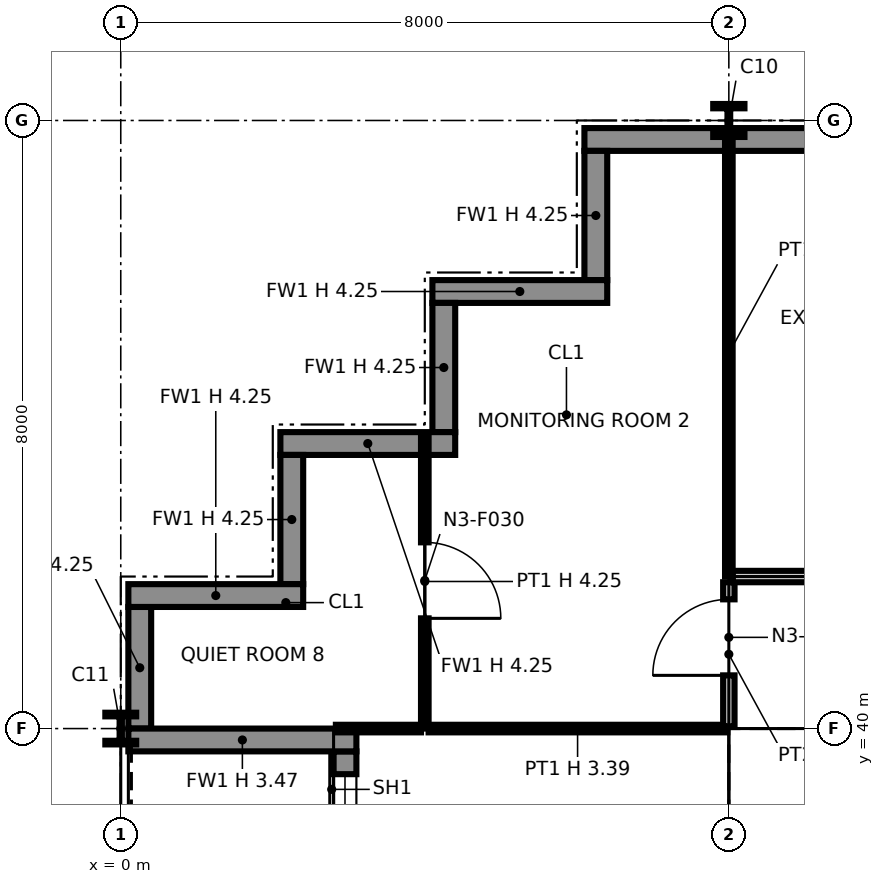
"""IFC4 building model, lengths in metres.
Left out: names, types, materials, properties, quantities, classifications, styles, units other than length and angle.
Written with IfcOpenShell. Run it as: python <this file> out.ifc"""

import sys

from ifc_helpers import new_model, si_unit, direction, frame, frame_2d, origin, origin_2d, place, context, subcontext, project, spatial, polyline, rectangle, i_section, outline, extrude, element, fill, save


model = new_model("IFC4")
c1 = context("Model", 3, precision=1e-05, world=origin(), true_north=direction((0.0, 1.0)))
c2 = subcontext(c1, "Body", "Model", "MODEL_VIEW")
j1 = project(units=[si_unit("LENGTHUNIT", "METRE"), si_unit("PLANEANGLEUNIT", "RADIAN")], contexts=[c1])
p1 = place(None, origin())
s1 = spatial("IfcSite", under=j1, at=p1, CompositionType="ELEMENT")
p2 = place(p1, origin())
s2 = spatial("IfcBuilding", under=s1, at=p2, CompositionType="ELEMENT")
p3 = place(p2, frame((0.0, 0.0, 61.2)))
s3 = spatial("IfcBuildingStorey", under=s2, at=p3, CompositionType="ELEMENT", Elevation=61.2)
p4 = place(p3, frame((0.0, 40.0, 0.0), z_axis=(0.0, 0.0, 1.0), x_axis=(1.0, 0.0, 0.0)))
e1 = element("IfcColumn", 1, at=p4, inside=s3, PredefinedType="COLUMN", context=c2, shape_type="SweptSolid", body=[
    extrude(i_section(OverallWidth=0.406, OverallDepth=0.417, WebThickness=0.03, FlangeThickness=0.048, at=origin_2d()), origin(), (0.0, 0.0, 1.0), 4.25),
])
p5 = place(p3, frame((8.0, 40.0, 0.0), z_axis=(0.0, 0.0, 1.0), x_axis=(1.0, 0.0, 0.0)))
e2 = element("IfcColumn", 2, at=p5, inside=s3, PredefinedType="COLUMN", context=c2, shape_type="SweptSolid", body=[
    extrude(i_section(OverallWidth=0.399, OverallDepth=0.386, WebThickness=0.021, FlangeThickness=0.033, at=origin_2d()), origin(), (0.0, 0.0, 1.0), 4.25),
])
p6 = place(p3, frame((8.0, 48.0, 0.0), z_axis=(0.0, 0.0, 1.0), x_axis=(1.0, 0.0, 0.0)))
e3 = element("IfcColumn", 3, at=p6, inside=s3, PredefinedType="COLUMN", context=c2, shape_type="SweptSolid", body=[
    extrude(i_section(OverallWidth=0.411, OverallDepth=0.434, WebThickness=0.036, FlangeThickness=0.057, at=origin_2d()), origin(), (0.0, 0.0, 1.0), 4.25),
])
p7 = place(p3, frame((0.25, 41.6, 0.0), z_axis=(0.0, 0.0, 1.0), x_axis=(0.0, -1.0, 0.0)))
e4 = element("IfcWall", 4, at=p7, inside=s3, PredefinedType="SOLIDWALL", context=c2, shape_type="SweptSolid", body=[
    extrude(rectangle(XDim=1.6, YDim=0.3, at=frame_2d((0.8, 0.0))), origin(), (0.0, 0.0, 1.0), 4.25),
])
p8 = place(p3, frame((2.95, 39.7, 0.0), z_axis=(0.0, 0.0, 1.0), x_axis=(0.0, -1.0, 0.0)))
e5 = element("IfcWall", 5, at=p8, inside=s3, PredefinedType="SOLIDWALL", context=c2, shape_type="SweptSolid", body=[
    extrude(rectangle(XDim=7.4, YDim=0.3, at=frame_2d((3.7, 0.0))), origin(), (0.0, 0.0, 1.0), 4.25),
])
p9 = place(p8, frame((0.3, 0.0, 0.9)))
e6 = element("IfcOpeningElement", 6, at=p9, cuts=e5, PredefinedType="OPENING", context=c2, shape_type="SweptSolid", body=[
    extrude(rectangle(XDim=2.8, YDim=2.2, at=frame_2d((1.4, 1.1))), frame((0.0, 0.16, 0.0), z_axis=(0.0, -1.0, 0.0), x_axis=(1.0, 0.0, 0.0)), (0.0, 0.0, 1.0), 0.32),
])
p10 = place(p8, frame((4.7, 0.0, 0.0)))
e7 = element("IfcOpeningElement", 7, at=p10, cuts=e5, PredefinedType="OPENING", context=c2, shape_type="SweptSolid", body=[
    extrude(rectangle(XDim=2.0, YDim=2.4, at=frame_2d((1.0, 1.2))), frame((0.0, 0.16, 0.0), z_axis=(0.0, -1.0, 0.0), x_axis=(1.0, 0.0, 0.0)), (0.0, 0.0, 1.0), 0.32),
])
p11 = place(p3, frame((0.1, 39.85, 0.0), z_axis=(0.0, 0.0, 1.0), x_axis=(1.0, 0.0, 0.0)))
e8 = element("IfcWall", 8, at=p11, inside=s3, PredefinedType="SOLIDWALL", context=c2, shape_type="SweptSolid", body=[
    extrude(rectangle(XDim=3.0, YDim=0.3, at=frame_2d((1.5, 0.0))), origin(), (0.0, 0.0, 1.0), 3.469),
])
p12 = place(p3, frame((16.0, 47.75, 0.0), z_axis=(0.0, 0.0, 1.0), x_axis=(-1.0, 0.0, 0.0)))
e9 = element("IfcWall", 9, at=p12, inside=s3, PredefinedType="SOLIDWALL", context=c2, shape_type="SweptSolid", body=[
    extrude(rectangle(XDim=9.9, YDim=0.3, at=frame_2d((4.95, 0.0))), origin(), (0.0, 0.0, 1.0), 4.25),
])
p13 = place(p3, frame((6.25, 47.6, 0.0), z_axis=(0.0, 0.0, 1.0), x_axis=(0.0, -1.0, 0.0)))
e10 = element("IfcWall", 10, at=p13, inside=s3, PredefinedType="SOLIDWALL", context=c2, shape_type="SweptSolid", body=[
    extrude(rectangle(XDim=1.7, YDim=0.3, at=frame_2d((0.85, 0.0))), origin(), (0.0, 0.0, 1.0), 4.25),
])
p14 = place(p3, frame((6.4, 45.75, 0.0), z_axis=(0.0, 0.0, 1.0), x_axis=(-1.0, 0.0, 0.0)))
e11 = element("IfcWall", 11, at=p14, inside=s3, PredefinedType="SOLIDWALL", context=c2, shape_type="SweptSolid", body=[
    extrude(rectangle(XDim=2.3, YDim=0.3, at=frame_2d((1.15, 0.0))), origin(), (0.0, 0.0, 1.0), 4.25),
])
p15 = place(p3, frame((4.25, 45.6, 0.0), z_axis=(0.0, 0.0, 1.0), x_axis=(0.0, -1.0, 0.0)))
e12 = element("IfcWall", 12, at=p15, inside=s3, PredefinedType="SOLIDWALL", context=c2, shape_type="SweptSolid", body=[
    extrude(rectangle(XDim=1.7, YDim=0.3, at=frame_2d((0.85, 0.0))), origin(), (0.0, 0.0, 1.0), 4.25),
])
p16 = place(p3, frame((4.4, 43.75, 0.0), z_axis=(0.0, 0.0, 1.0), x_axis=(-1.0, 0.0, 0.0)))
e13 = element("IfcWall", 13, at=p16, inside=s3, PredefinedType="SOLIDWALL", context=c2, shape_type="SweptSolid", body=[
    extrude(rectangle(XDim=2.3, YDim=0.3, at=frame_2d((1.15, 0.0))), origin(), (0.0, 0.0, 1.0), 4.25),
])
p17 = place(p3, frame((2.25, 43.6, 0.0), z_axis=(0.0, 0.0, 1.0), x_axis=(0.0, -1.0, 0.0)))
e14 = element("IfcWall", 14, at=p17, inside=s3, PredefinedType="SOLIDWALL", context=c2, shape_type="SweptSolid", body=[
    extrude(rectangle(XDim=1.7, YDim=0.3, at=frame_2d((0.85, 0.0))), origin(), (0.0, 0.0, 1.0), 4.25),
])
p18 = place(p3, frame((2.4, 41.75, 0.0), z_axis=(0.0, 0.0, 1.0), x_axis=(-1.0, 0.0, 0.0)))
e15 = element("IfcWall", 15, at=p18, inside=s3, PredefinedType="SOLIDWALL", context=c2, shape_type="SweptSolid", body=[
    extrude(rectangle(XDim=2.3, YDim=0.3, at=frame_2d((1.15, 0.0))), origin(), (0.0, 0.0, 1.0), 4.25),
])
p19 = place(p3, frame((8.75, 32.85, 0.0), z_axis=(0.0, 0.0, 1.0), x_axis=(0.0, 1.0, 0.0)))
e16 = element("IfcWall", 16, at=p19, inside=s3, PredefinedType="PARTITIONING", context=c2, shape_type="SweptSolid", body=[
    extrude(outline(polyline([(0.0, 0.0), (6.3, 0.0), (6.3, 4.25), (3.231, 4.25), (3.23, 3.789), (3.07, 3.789), (3.069, 4.25), (0.0, 4.25), (0.0, 0.0)])), frame((0.0, 0.1, 0.0), z_axis=(0.0, -1.0, 0.0), x_axis=(1.0, 0.0, 0.0)), (0.0, 0.0, 1.0), 0.2),
])
p20 = place(p3, frame((8.65, 39.25, 0.0), z_axis=(0.0, 0.0, 1.0), x_axis=(1.0, 0.0, 0.0)))
e17 = element("IfcWall", 17, at=p20, inside=s3, PredefinedType="PARTITIONING", context=c2, shape_type="SweptSolid", body=[
    extrude(outline(polyline([(0.0, 0.0), (14.7, 0.0), (14.7, 4.25), (7.469, 4.25), (7.469, 3.632), (7.231, 3.632), (7.23, 4.25), (0.0, 4.25), (0.0, 0.0)])), frame((0.0, 0.1, 0.0), z_axis=(0.0, -1.0, 0.0), x_axis=(1.0, 0.0, 0.0)), (0.0, 0.0, 1.0), 0.2),
])
p21 = place(p3, frame((2.83, 40.0, 0.0), z_axis=(0.0, 0.0, 1.0), x_axis=(1.0, 0.0, 0.0)))
e18 = element("IfcWall", 18, at=p21, inside=s3, PredefinedType="PARTITIONING", context=c2, shape_type="SweptSolid", body=[
    extrude(rectangle(XDim=1.12, YDim=0.1, at=frame_2d((0.56, 0.0))), origin(), (0.0, 0.0, 1.0), 3.391),
])
p22 = place(p3, frame((4.05, 40.0, 0.0), z_axis=(0.0, 0.0, 1.0), x_axis=(1.0, 0.0, 0.0)))
e19 = element("IfcWall", 19, at=p22, inside=s3, PredefinedType="PARTITIONING", context=c2, shape_type="SweptSolid", body=[
    extrude(rectangle(XDim=3.92, YDim=0.1, at=frame_2d((1.96, 0.0))), origin(), (0.0, 0.0, 1.0), 3.391),
])
p23 = place(p3, frame((4.0, 40.0, 0.0), z_axis=(0.0, 0.0, 1.0), x_axis=(0.0, 1.0, 0.0)))
e20 = element("IfcWall", 20, at=p23, inside=s3, PredefinedType="PARTITIONING", context=c2, shape_type="SweptSolid", body=[
    extrude(rectangle(XDim=3.87, YDim=0.1, at=frame_2d((1.935, 0.0))), origin(), (0.0, 0.0, 1.0), 4.25),
])
p24 = place(p23, frame((2.45, 0.0, 0.0), z_axis=(0.0, 0.0, 1.0), x_axis=(-1.0, 0.0, 0.0)))
e21 = element("IfcOpeningElement", 21, at=p24, cuts=e20, PredefinedType="OPENING", context=c2, shape_type="SweptSolid", body=[
    extrude(rectangle(XDim=1.0, YDim=2.1, at=frame_2d((0.5, 1.05))), frame((0.0, 0.06, 0.0), z_axis=(0.0, -1.0, 0.0), x_axis=(1.0, 0.0, 0.0)), (0.0, 0.0, 1.0), 0.12),
])
p25 = place(p3, frame((8.0, 40.03, 0.0), z_axis=(0.0, 0.0, 1.0), x_axis=(0.0, 1.0, 0.0)))
e22 = element("IfcWall", 22, at=p25, inside=s3, PredefinedType="PARTITIONING", context=c2, shape_type="SweptSolid", body=[
    extrude(rectangle(XDim=1.895, YDim=0.15, at=frame_2d((0.948, 0.0))), origin(), (0.0, 0.0, 1.0), 3.391),
])
p26 = place(p25, frame((0.67, 0.0, 0.0)))
e23 = element("IfcOpeningElement", 23, at=p26, cuts=e22, PredefinedType="OPENING", context=c2, shape_type="SweptSolid", body=[
    extrude(rectangle(XDim=1.0, YDim=2.1, at=frame_2d((0.5, 1.05))), frame((0.0, 0.085, 0.0), z_axis=(0.0, -1.0, 0.0), x_axis=(1.0, 0.0, 0.0)), (0.0, 0.0, 1.0), 0.17),
])
p27 = place(p3, frame((8.05, 42.0, 0.0), z_axis=(0.0, 0.0, 1.0), x_axis=(1.0, 0.0, 0.0)))
e24 = element("IfcWall", 24, at=p27, inside=s3, PredefinedType="PARTITIONING", context=c2, shape_type="SweptSolid", body=[
    extrude(rectangle(XDim=33.95, YDim=0.15, at=frame_2d((16.975, 0.0))), origin(), (0.0, 0.0, 1.0), 4.25),
])
p28 = place(p27, frame((9.45, 0.0, 0.0)))
e25 = element("IfcOpeningElement", 25, at=p28, cuts=e24, PredefinedType="OPENING", context=c2, shape_type="SweptSolid", body=[
    extrude(rectangle(XDim=1.0, YDim=2.1, at=frame_2d((0.5, 1.05))), frame((0.0, 0.085, 0.0), z_axis=(0.0, -1.0, 0.0), x_axis=(1.0, 0.0, 0.0)), (0.0, 0.0, 1.0), 0.17),
])
p29 = place(p27, frame((13.45, 0.0, 0.0)))
e26 = element("IfcOpeningElement", 26, at=p29, cuts=e24, PredefinedType="OPENING", context=c2, shape_type="SweptSolid", body=[
    extrude(rectangle(XDim=1.0, YDim=2.1, at=frame_2d((0.5, 1.05))), frame((0.0, 0.085, 0.0), z_axis=(0.0, -1.0, 0.0), x_axis=(1.0, 0.0, 0.0)), (0.0, 0.0, 1.0), 0.17),
])
p30 = place(p27, frame((27.45, 0.0, 0.0)))
e27 = element("IfcOpeningElement", 27, at=p30, cuts=e24, PredefinedType="OPENING", context=c2, shape_type="SweptSolid", body=[
    extrude(rectangle(XDim=1.0, YDim=2.1, at=frame_2d((0.5, 1.05))), frame((0.0, 0.085, 0.0), z_axis=(0.0, -1.0, 0.0), x_axis=(1.0, 0.0, 0.0)), (0.0, 0.0, 1.0), 0.17),
])
p31 = place(p27, frame((1.45, 0.0, 0.0)))
e28 = element("IfcOpeningElement", 28, at=p31, cuts=e24, PredefinedType="OPENING", context=c2, shape_type="SweptSolid", body=[
    extrude(rectangle(XDim=1.0, YDim=2.1, at=frame_2d((0.5, 1.05))), frame((0.0, 0.085, 0.0), z_axis=(0.0, -1.0, 0.0), x_axis=(1.0, 0.0, 0.0)), (0.0, 0.0, 1.0), 0.17),
])
p32 = place(p27, frame((5.45, 0.0, 0.0)))
e29 = element("IfcOpeningElement", 29, at=p32, cuts=e24, PredefinedType="OPENING", context=c2, shape_type="SweptSolid", body=[
    extrude(rectangle(XDim=1.0, YDim=2.1, at=frame_2d((0.5, 1.05))), frame((0.0, 0.085, 0.0), z_axis=(0.0, -1.0, 0.0), x_axis=(1.0, 0.0, 0.0)), (0.0, 0.0, 1.0), 0.17),
])
p33 = place(p27, frame((17.45, 0.0, 0.0)))
e30 = element("IfcOpeningElement", 30, at=p33, cuts=e24, PredefinedType="OPENING", context=c2, shape_type="SweptSolid", body=[
    extrude(rectangle(XDim=1.0, YDim=2.1, at=frame_2d((0.5, 1.05))), frame((0.0, 0.085, 0.0), z_axis=(0.0, -1.0, 0.0), x_axis=(1.0, 0.0, 0.0)), (0.0, 0.0, 1.0), 0.17),
])
p34 = place(p27, frame((21.45, 0.0, 0.0)))
e31 = element("IfcOpeningElement", 31, at=p34, cuts=e24, PredefinedType="OPENING", context=c2, shape_type="SweptSolid", body=[
    extrude(rectangle(XDim=1.0, YDim=2.1, at=frame_2d((0.5, 1.05))), frame((0.0, 0.085, 0.0), z_axis=(0.0, -1.0, 0.0), x_axis=(1.0, 0.0, 0.0)), (0.0, 0.0, 1.0), 0.17),
])
p35 = place(p3, frame((8.0, 42.0, 0.0), z_axis=(0.0, 0.0, 1.0), x_axis=(0.0, 1.0, 0.0)))
e32 = element("IfcWall", 32, at=p35, inside=s3, PredefinedType="PARTITIONING", context=c2, shape_type="SweptSolid", body=[
    extrude(rectangle(XDim=5.87, YDim=0.1, at=frame_2d((2.935, 0.0))), origin(), (0.0, 0.0, 1.0), 3.391),
])
p36 = place(p9, origin())
e33 = element("IfcWindow", 33, at=p36, inside=s3, PartitioningType="SINGLE_PANEL", PredefinedType="WINDOW", context=c2, shape_type="SweptSolid", body=[
    extrude(rectangle(XDim=2.8, YDim=2.2, at=frame_2d((1.4, 1.1))), frame((0.0, 0.03, 0.0), z_axis=(0.0, -1.0, 0.0), x_axis=(1.0, 0.0, 0.0)), (0.0, 0.0, 1.0), 0.06),
])
fill(e6, e33)
p37 = place(p26, origin())
e34 = element("IfcDoor", 34, at=p37, inside=s3, OperationType="SINGLE_SWING_LEFT", PredefinedType="DOOR", context=c2, shape_type="SweptSolid", body=[
    extrude(rectangle(XDim=1.0, YDim=2.1, at=frame_2d((0.5, 1.05))), frame((0.0, 0.025, 0.0), z_axis=(0.0, -1.0, 0.0), x_axis=(1.0, 0.0, 0.0)), (0.0, 0.0, 1.0), 0.05),
])
fill(e23, e34)
p38 = place(p24, origin())
e35 = element("IfcDoor", 35, at=p38, inside=s3, OperationType="SINGLE_SWING_RIGHT", PredefinedType="DOOR", context=c2, shape_type="SweptSolid", body=[
    extrude(rectangle(XDim=1.0, YDim=2.1, at=frame_2d((0.5, 1.05))), frame((0.0, 0.025, 0.0), z_axis=(0.0, -1.0, 0.0), x_axis=(1.0, 0.0, 0.0)), (0.0, 0.0, 1.0), 0.05),
])
fill(e21, e35)
save(model, sys.argv[1])
